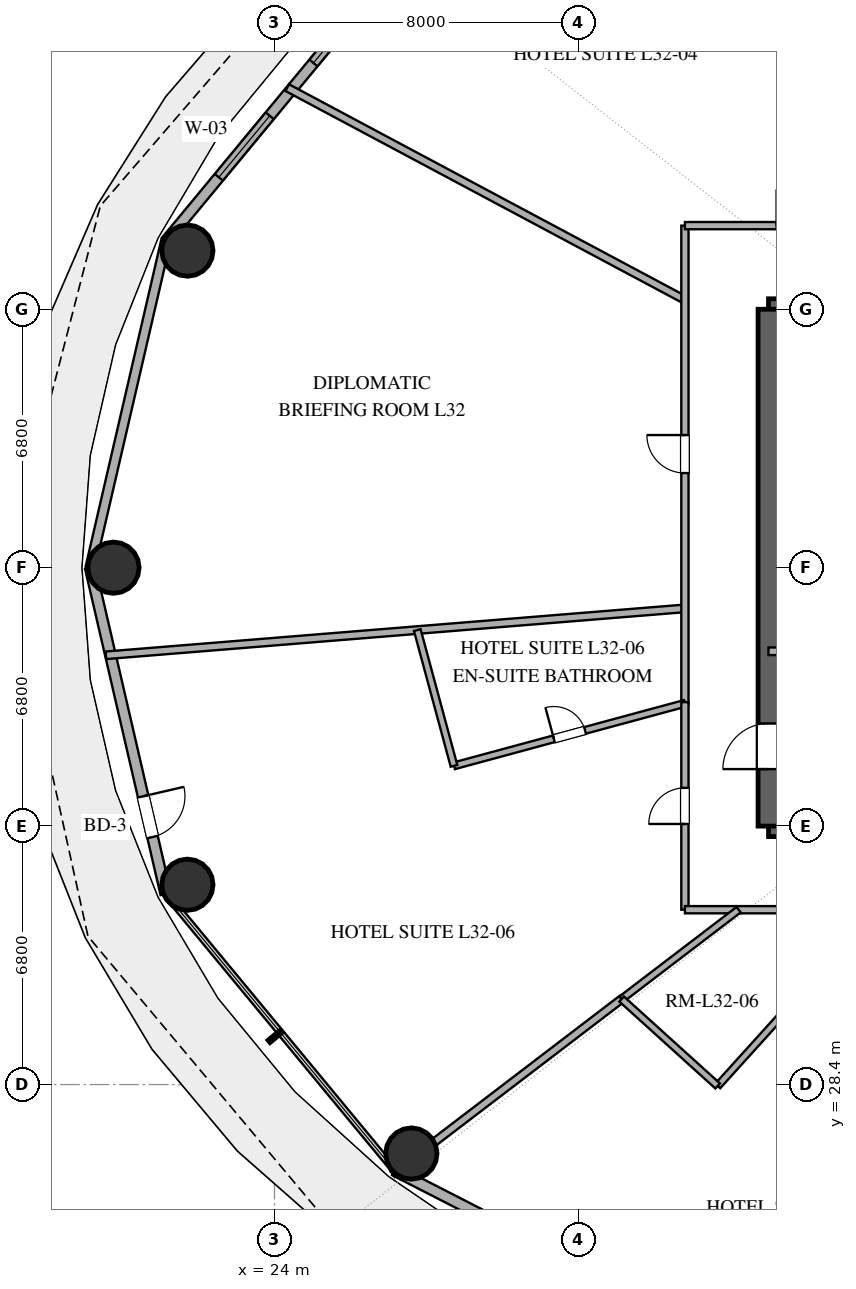
"""IFC4 building model, lengths in metres.
Left out: names, types, materials, properties, quantities, classifications, styles, units other than length and angle.
Written with IfcOpenShell. Run it as: python <this file> out.ifc"""

import sys

from ifc_helpers import new_model, si_unit, direction, frame, frame_2d, origin, origin_2d, place, context, subcontext, project, spatial, rectangle, hollow_circle, extrude, element, fill, save


model = new_model("IFC4")
c1 = context("Model", 3, precision=1e-05, world=origin(), true_north=direction((0.0, 1.0)))
c2 = subcontext(c1, "Body", "Model", "MODEL_VIEW")
j1 = project(units=[si_unit("LENGTHUNIT", "METRE"), si_unit("PLANEANGLEUNIT", "RADIAN")], contexts=[c1])
p1 = place(None, origin())
s1 = spatial("IfcSite", under=j1, at=p1, CompositionType="ELEMENT")
p2 = place(p1, origin())
s2 = spatial("IfcBuilding", under=s1, at=p2, CompositionType="ELEMENT")
p3 = place(p2, frame((0.0, 0.0, 127.2)))
s3 = spatial("IfcBuildingStorey", under=s2, at=p3, CompositionType="ELEMENT", Elevation=127.2)
for number, where, z_axis, x_axis in (
    (1, (37.0, 35.2, 0.0), (0.0, 0.0, 1.0), (1.0, 0.0, 0.0)),
    (2, (37.0, 48.8, 0.0), (0.0, 0.0, 1.0), (1.0, 0.0, 0.0)),
):
    element("IfcWall", number, at=place(p3, frame(where, z_axis=z_axis, x_axis=x_axis)), inside=s3, PredefinedType="SHEAR", context=c2, shape_type="SweptSolid", body=[
        extrude(rectangle(XDim=4.0, YDim=0.55, at=frame_2d((2.0, 0.0))), origin(), (0.0, 0.0, 1.0), 3.38),
    ])
p4 = place(p3, frame((37.0, 35.2, 0.0), z_axis=(0.0, 0.0, 1.0), x_axis=(0.0, 1.0, 0.0)))
e3 = element("IfcWall", 3, at=p4, inside=s3, PredefinedType="SHEAR", context=c2, shape_type="SweptSolid", body=[
    extrude(rectangle(XDim=13.6, YDim=0.55, at=frame_2d((6.8, 0.0))), origin(), (0.0, 0.0, 1.0), 3.38),
])
p5 = place(p4, frame((1.5, 0.0, 0.0)))
e4 = element("IfcOpeningElement", 4, at=p5, cuts=e3, PredefinedType="OPENING", context=c2, shape_type="SweptSolid", body=[
    extrude(rectangle(XDim=1.2, YDim=2.15, at=frame_2d((0.6, 1.075))), frame((0.0, 0.285, 0.0), z_axis=(0.0, -1.0, 0.0), x_axis=(1.0, 0.0, 0.0)), (0.0, 0.0, 1.0), 0.57),
])
for number, where, z_axis, x_axis in (
    (5, (21.709, 50.343, 0.0), (0.0, 0.0, 1.0), (1.0, 0.0, 0.0)),
    (6, (19.763, 42.0, 0.0), (0.0, 0.0, 1.0), (1.0, 0.0, 0.0)),
    (7, (21.709, 33.657, 0.0), (0.0, 0.0, 1.0), (1.0, 0.0, 0.0)),
    (8, (27.602, 26.585, 0.0), (0.0, 0.0, 1.0), (1.0, 0.0, 0.0)),
):
    element("IfcColumn", number, at=place(p3, frame(where, z_axis=z_axis, x_axis=x_axis)), inside=s3, PredefinedType="COLUMN", context=c2, shape_type="SweptSolid", body=[
        extrude(hollow_circle(Radius=0.675, WallThickness=0.036, at=origin_2d()), origin(), (0.0, 0.0, 1.0), 3.38),
    ])
p6 = place(p3, frame((27.16, 57.86, 0.0), z_axis=(0.0, 0.0, 1.0), x_axis=(-0.637505817448, -0.770445541696, 0.0)))
e9 = element("IfcWall", 9, at=p6, inside=s3, PredefinedType="SOLIDWALL", context=c2, shape_type="SweptSolid", body=[
    extrude(rectangle(XDim=9.445, YDim=0.28, at=frame_2d((4.723, 0.0))), origin(), (0.0, 0.0, 1.0), 3.38),
])
p7 = place(p6, frame((2.15, 0.0, 0.85)))
e10 = element("IfcOpeningElement", 10, at=p7, cuts=e9, PredefinedType="OPENING", context=c2, shape_type="SweptSolid", body=[
    extrude(rectangle(XDim=1.2, YDim=1.6, at=frame_2d((0.6, 0.8))), frame((0.0, 0.15, 0.0), z_axis=(0.0, -1.0, 0.0), x_axis=(1.0, 0.0, 0.0)), (0.0, 0.0, 1.0), 0.3),
])
p8 = place(p6, frame((5.153, 0.0, 0.85)))
e11 = element("IfcOpeningElement", 11, at=p8, cuts=e9, PredefinedType="OPENING", context=c2, shape_type="SweptSolid", body=[
    extrude(rectangle(XDim=2.1, YDim=2.2, at=frame_2d((1.05, 1.1))), frame((0.0, 0.15, 0.0), z_axis=(0.0, -1.0, 0.0), x_axis=(1.0, 0.0, 0.0)), (0.0, 0.0, 1.0), 0.3),
])
p9 = place(p3, frame((21.139, 50.583, 0.0), z_axis=(0.0, 0.0, 1.0), x_axis=(-0.22558597182, -0.974223264616, 0.0)))
e12 = element("IfcWall", 12, at=p9, inside=s3, PredefinedType="SOLIDWALL", context=c2, shape_type="SweptSolid", body=[
    extrude(rectangle(XDim=8.811, YDim=0.25, at=frame_2d((4.405, 0.0))), origin(), (0.0, 0.0, 1.0), 3.38),
])
p10 = place(p3, frame((19.151, 42.0, 0.0), z_axis=(0.0, 0.0, 1.0), x_axis=(0.22558597182, -0.974223264616, 0.0)))
e13 = element("IfcWall", 13, at=p10, inside=s3, PredefinedType="SOLIDWALL", context=c2, shape_type="SweptSolid", body=[
    extrude(rectangle(XDim=8.811, YDim=0.28, at=frame_2d((4.405, 0.0))), origin(), (0.0, 0.0, 1.0), 3.38),
])
p11 = place(p10, frame((6.175, 0.0, 0.0)))
e14 = element("IfcOpeningElement", 14, at=p11, cuts=e13, PredefinedType="OPENING", context=c2, shape_type="SweptSolid", body=[
    extrude(rectangle(XDim=1.1, YDim=2.25, at=frame_2d((0.55, 1.125))), frame((0.0, 0.15, 0.0), z_axis=(0.0, -1.0, 0.0), x_axis=(1.0, 0.0, 0.0)), (0.0, 0.0, 1.0), 0.3),
])
p12 = place(p3, frame((27.16, 26.14, 0.0), z_axis=(0.0, 0.0, 1.0), x_axis=(0.889959505023, -0.45603955905, 0.0)))
e15 = element("IfcWall", 15, at=p12, inside=s3, PredefinedType="SOLIDWALL", context=c2, shape_type="SweptSolid", body=[
    extrude(rectangle(XDim=10.662, YDim=0.28, at=frame_2d((5.331, 0.0))), origin(), (0.0, 0.0, 1.0), 3.38),
])
p13 = place(p12, frame((3.131, 0.0, 0.85)))
e16 = element("IfcOpeningElement", 16, at=p13, cuts=e15, PredefinedType="OPENING", context=c2, shape_type="SweptSolid", body=[
    extrude(rectangle(XDim=1.5, YDim=2.0, at=frame_2d((0.75, 1.0))), frame((0.0, 0.15, 0.0), z_axis=(0.0, -1.0, 0.0), x_axis=(1.0, 0.0, 0.0)), (0.0, 0.0, 1.0), 0.3),
])
p14 = place(p12, frame((6.171, 0.0, 0.85)))
e17 = element("IfcOpeningElement", 17, at=p14, cuts=e15, PredefinedType="OPENING", context=c2, shape_type="SweptSolid", body=[
    extrude(rectangle(XDim=1.5, YDim=2.0, at=frame_2d((0.75, 1.0))), frame((0.0, 0.15, 0.0), z_axis=(0.0, -1.0, 0.0), x_axis=(1.0, 0.0, 0.0)), (0.0, 0.0, 1.0), 0.3),
])
p15 = place(p3, frame((37.0, 39.8, 0.0), z_axis=(0.0, 0.0, 1.0), x_axis=(1.0, 0.0, 0.0)))
e18 = element("IfcWall", 18, at=p15, inside=s3, PredefinedType="SOLIDWALL", context=c2, shape_type="SweptSolid", body=[
    extrude(rectangle(XDim=4.0, YDim=0.2, at=frame_2d((2.0, 0.0))), origin(), (0.0, 0.0, 1.0), 2.74),
])
p16 = place(p15, frame((1.45, 0.0, 0.0)))
e19 = element("IfcOpeningElement", 19, at=p16, cuts=e18, PredefinedType="OPENING", context=c2, shape_type="SweptSolid", body=[
    extrude(rectangle(XDim=1.1, YDim=2.15, at=frame_2d((0.55, 1.075))), frame((0.0, 0.11, 0.0), z_axis=(0.0, -1.0, 0.0), x_axis=(1.0, 0.0, 0.0)), (0.0, 0.0, 1.0), 0.22),
])
p17 = place(p3, frame((24.335, 54.631, 0.0), z_axis=(0.0, 0.0, 1.0), x_axis=(0.882197358086, -0.470879837524, 0.0)))
e20 = element("IfcWall", 20, at=p17, inside=s3, PredefinedType="PARTITIONING", context=c2, shape_type="SweptSolid", body=[
    extrude(rectangle(XDim=11.862, YDim=0.2, at=frame_2d((5.931, 0.0))), origin(), (0.0, 0.0, 1.0), 2.74),
])
p18 = place(p3, frame((34.8, 40.929, 0.0), z_axis=(0.0, 0.0, 1.0), x_axis=(-0.996728109279, -0.080827446901, 0.0)))
e21 = element("IfcWall", 21, at=p18, inside=s3, PredefinedType="PARTITIONING", context=c2, shape_type="SweptSolid", body=[
    extrude(rectangle(XDim=15.287, YDim=0.2, at=frame_2d((7.644, 0.0))), origin(), (0.0, 0.0, 1.0), 2.74),
])
p19 = place(p3, frame((34.8, 38.396, 0.0), z_axis=(0.0, 0.0, 1.0), x_axis=(0.0, 1.0, 0.0)))
e22 = element("IfcWall", 22, at=p19, inside=s3, PredefinedType="PARTITIONING", context=c2, shape_type="SweptSolid", body=[
    extrude(rectangle(XDim=12.604, YDim=0.19, at=frame_2d((6.302, 0.0))), origin(), (0.0, 0.0, 1.0), 2.74),
])
p20 = place(p19, frame((6.094, 0.0, 0.0)))
e23 = element("IfcOpeningElement", 23, at=p20, cuts=e22, PredefinedType="OPENING", context=c2, shape_type="SweptSolid", body=[
    extrude(rectangle(XDim=1.0, YDim=2.2, at=frame_2d((0.5, 1.1))), frame((0.0, 0.105, 0.0), z_axis=(0.0, -1.0, 0.0), x_axis=(1.0, 0.0, 0.0)), (0.0, 0.0, 1.0), 0.21),
])
p21 = place(p3, frame((27.105, 26.046, 0.0), z_axis=(0.0, 0.0, 1.0), x_axis=(0.794798861724, 0.606872943376, 0.0)))
e24 = element("IfcWall", 24, at=p21, inside=s3, PredefinedType="PARTITIONING", context=c2, shape_type="SweptSolid", body=[
    extrude(rectangle(XDim=7.586, YDim=0.2, at=frame_2d((3.793, 0.0))), origin(), (0.0, 0.0, 1.0), 2.74),
])
p22 = place(p3, frame((42.974, 51.0, 0.0), z_axis=(0.0, 0.0, 1.0), x_axis=(-0.487587337482, 0.873074216964, 0.0)))
e25 = element("IfcWall", 25, at=p22, inside=s3, PredefinedType="PARTITIONING", context=c2, shape_type="SweptSolid", body=[
    extrude(rectangle(XDim=13.446, YDim=0.2, at=frame_2d((6.723, 0.0))), origin(), (0.0, 0.0, 1.0), 2.74),
])
p23 = place(p3, frame((28.724, 36.786, 0.0), z_axis=(0.0, 0.0, 1.0), x_axis=(0.965306865657, 0.261118086535, 0.0)))
e26 = element("IfcWall", 26, at=p23, inside=s3, PredefinedType="PLUMBINGWALL", context=c2, shape_type="SweptSolid", body=[
    extrude(rectangle(XDim=6.294, YDim=0.18, at=frame_2d((3.147, 0.0))), origin(), (0.0, 0.0, 1.0), 2.74),
])
p24 = place(p23, frame((2.722, 0.0, 0.0)))
e27 = element("IfcOpeningElement", 27, at=p24, cuts=e26, PredefinedType="OPENING", context=c2, shape_type="SweptSolid", body=[
    extrude(rectangle(XDim=0.85, YDim=2.1, at=frame_2d((0.425, 1.05))), frame((0.0, 0.1, 0.0), z_axis=(0.0, -1.0, 0.0), x_axis=(1.0, 0.0, 0.0)), (0.0, 0.0, 1.0), 0.2),
])
p25 = place(p3, frame((39.857, 33.0, 0.0), z_axis=(0.0, 0.0, 1.0), x_axis=(-0.670890833363, -0.741556127147, 0.0)))
e28 = element("IfcWall", 28, at=p25, inside=s3, PredefinedType="PLUMBINGWALL", context=c2, shape_type="SweptSolid", body=[
    extrude(rectangle(XDim=6.253, YDim=0.18, at=frame_2d((3.127, 0.0))), origin(), (0.0, 0.0, 1.0), 2.74),
])
p26 = place(p25, frame((2.702, 0.0, 0.0)))
e29 = element("IfcOpeningElement", 29, at=p26, cuts=e28, PredefinedType="OPENING", context=c2, shape_type="SweptSolid", body=[
    extrude(rectangle(XDim=0.85, YDim=2.1, at=frame_2d((0.425, 1.05))), frame((0.0, 0.1, 0.0), z_axis=(0.0, -1.0, 0.0), x_axis=(1.0, 0.0, 0.0)), (0.0, 0.0, 1.0), 0.2),
])
p27 = place(p3, frame((34.8, 51.0, 0.0), z_axis=(0.0, 0.0, 1.0), x_axis=(1.0, 0.0, 0.0)))
e30 = element("IfcWall", 30, at=p27, inside=s3, PredefinedType="PARTITIONING", context=c2, shape_type="SweptSolid", body=[
    extrude(rectangle(XDim=8.21, YDim=0.19, at=frame_2d((4.105, 0.0))), origin(), (0.0, 0.0, 1.0), 2.74),
])
p28 = place(p27, frame((2.412, 0.0, 0.0)))
e31 = element("IfcOpeningElement", 31, at=p28, cuts=e30, PredefinedType="OPENING", context=c2, shape_type="SweptSolid", body=[
    extrude(rectangle(XDim=0.95, YDim=2.15, at=frame_2d((0.475, 1.075))), frame((0.0, 0.105, 0.0), z_axis=(0.0, -1.0, 0.0), x_axis=(1.0, 0.0, 0.0)), (0.0, 0.0, 1.0), 0.21),
])
p29 = place(p3, frame((34.8, 33.0, 0.0), z_axis=(0.0, 0.0, 1.0), x_axis=(0.0, 1.0, 0.0)))
e32 = element("IfcWall", 32, at=p29, inside=s3, PredefinedType="PARTITIONING", context=c2, shape_type="SweptSolid", body=[
    extrude(rectangle(XDim=5.463, YDim=0.19, at=frame_2d((2.731, 0.0))), origin(), (0.0, 0.0, 1.0), 2.74),
])
p30 = place(p29, frame((2.256, 0.0, 0.0)))
e33 = element("IfcOpeningElement", 33, at=p30, cuts=e32, PredefinedType="OPENING", context=c2, shape_type="SweptSolid", body=[
    extrude(rectangle(XDim=0.95, YDim=2.15, at=frame_2d((0.475, 1.075))), frame((0.0, 0.105, 0.0), z_axis=(0.0, -1.0, 0.0), x_axis=(1.0, 0.0, 0.0)), (0.0, 0.0, 1.0), 0.21),
])
p31 = place(p3, frame((51.914, 33.0, 0.0), z_axis=(0.0, 0.0, 1.0), x_axis=(-1.0, 0.0, 0.0)))
e34 = element("IfcWall", 34, at=p31, inside=s3, PredefinedType="PARTITIONING", context=c2, shape_type="SweptSolid", body=[
    extrude(rectangle(XDim=17.114, YDim=0.19, at=frame_2d((8.557, 0.0))), origin(), (0.0, 0.0, 1.0), 2.74),
])
p32 = place(p31, frame((4.021, 0.0, 0.0)))
e35 = element("IfcOpeningElement", 35, at=p32, cuts=e34, PredefinedType="OPENING", context=c2, shape_type="SweptSolid", body=[
    extrude(rectangle(XDim=1.0, YDim=2.2, at=frame_2d((0.5, 1.1))), frame((0.0, 0.105, 0.0), z_axis=(0.0, -1.0, 0.0), x_axis=(1.0, 0.0, 0.0)), (0.0, 0.0, 1.0), 0.21),
])
p33 = place(p31, frame((9.145, 0.0, 0.0)))
e36 = element("IfcOpeningElement", 36, at=p33, cuts=e34, PredefinedType="OPENING", context=c2, shape_type="SweptSolid", body=[
    extrude(rectangle(XDim=0.95, YDim=2.15, at=frame_2d((0.475, 1.075))), frame((0.0, 0.105, 0.0), z_axis=(0.0, -1.0, 0.0), x_axis=(1.0, 0.0, 0.0)), (0.0, 0.0, 1.0), 0.21),
])
p34 = place(p3, frame((33.135, 30.649, 0.0), z_axis=(0.0, 0.0, 1.0), x_axis=(0.794788820215, 0.606886094141, 0.0)))
e37 = element("IfcWall", 37, at=p34, inside=s3, PredefinedType="PLUMBINGWALL", context=c2, shape_type="SweptSolid", body=[
    extrude(rectangle(XDim=3.873, YDim=0.18, at=frame_2d((1.937, 0.0))), origin(), (0.0, 0.0, 1.0), 2.74),
])
p35 = place(p3, frame((27.758, 40.358, 0.0), z_axis=(0.0, 0.0, 1.0), x_axis=(0.261163229173, -0.96529465332, 0.0)))
e38 = element("IfcWall", 38, at=p35, inside=s3, PredefinedType="PLUMBINGWALL", context=c2, shape_type="SweptSolid", body=[
    extrude(rectangle(XDim=3.701, YDim=0.18, at=frame_2d((1.851, 0.0))), origin(), (0.0, 0.0, 1.0), 2.74),
])
p36 = place(p3, frame((35.662, 28.363, 0.0), z_axis=(0.0, 0.0, 1.0), x_axis=(-0.741571413778, 0.670873936196, 0.0)))
e39 = element("IfcWall", 39, at=p36, inside=s3, PredefinedType="PLUMBINGWALL", context=c2, shape_type="SweptSolid", body=[
    extrude(rectangle(XDim=3.408, YDim=0.18, at=frame_2d((1.704, 0.0))), origin(), (0.0, 0.0, 1.0), 2.74),
])
p37 = place(p7, origin())
e40 = element("IfcWindow", 40, at=p37, inside=s3, PartitioningType="SINGLE_PANEL", PredefinedType="WINDOW", context=c2, shape_type="SweptSolid", body=[
    extrude(rectangle(XDim=1.2, YDim=1.6, at=frame_2d((0.6, 0.8))), frame((0.0, 0.03, 0.0), z_axis=(0.0, -1.0, 0.0), x_axis=(1.0, 0.0, 0.0)), (0.0, 0.0, 1.0), 0.06),
])
fill(e10, e40)
p38 = place(p8, origin())
e41 = element("IfcWindow", 41, at=p38, inside=s3, PartitioningType="SINGLE_PANEL", PredefinedType="WINDOW", context=c2, shape_type="SweptSolid", body=[
    extrude(rectangle(XDim=2.1, YDim=2.2, at=frame_2d((1.05, 1.1))), frame((0.0, 0.03, 0.0), z_axis=(0.0, -1.0, 0.0), x_axis=(1.0, 0.0, 0.0)), (0.0, 0.0, 1.0), 0.06),
])
fill(e11, e41)
p39 = place(p11, origin())
e42 = element("IfcDoor", 42, at=p39, inside=s3, OperationType="SINGLE_SWING_LEFT", PredefinedType="DOOR", context=c2, shape_type="SweptSolid", body=[
    extrude(rectangle(XDim=1.1, YDim=2.25, at=frame_2d((0.55, 1.125))), frame((0.0, 0.025, 0.0), z_axis=(0.0, -1.0, 0.0), x_axis=(1.0, 0.0, 0.0)), (0.0, 0.0, 1.0), 0.05),
])
fill(e14, e42)
p40 = place(p5, origin())
e43 = element("IfcDoor", 43, at=p40, inside=s3, OperationType="SINGLE_SWING_LEFT", PredefinedType="DOOR", context=c2, shape_type="SweptSolid", body=[
    extrude(rectangle(XDim=1.2, YDim=2.15, at=frame_2d((0.6, 1.075))), frame((0.0, 0.025, 0.0), z_axis=(0.0, -1.0, 0.0), x_axis=(1.0, 0.0, 0.0)), (0.0, 0.0, 1.0), 0.05),
])
fill(e4, e43)
p41 = place(p20, origin())
e44 = element("IfcDoor", 44, at=p41, inside=s3, OperationType="SINGLE_SWING_RIGHT", PredefinedType="DOOR", context=c2, shape_type="SweptSolid", body=[
    extrude(rectangle(XDim=1.0, YDim=2.2, at=frame_2d((0.5, 1.1))), frame((0.0, 0.025, 0.0), z_axis=(0.0, -1.0, 0.0), x_axis=(1.0, 0.0, 0.0)), (0.0, 0.0, 1.0), 0.05),
])
fill(e23, e44)
p42 = place(p24, origin())
e45 = element("IfcDoor", 45, at=p42, inside=s3, OperationType="SINGLE_SWING_LEFT", PredefinedType="DOOR", context=c2, shape_type="SweptSolid", body=[
    extrude(rectangle(XDim=0.85, YDim=2.1, at=frame_2d((0.425, 1.05))), frame((0.0, 0.025, 0.0), z_axis=(0.0, -1.0, 0.0), x_axis=(1.0, 0.0, 0.0)), (0.0, 0.0, 1.0), 0.05),
])
fill(e27, e45)
p43 = place(p28, origin())
e46 = element("IfcDoor", 46, at=p43, inside=s3, OperationType="SINGLE_SWING_LEFT", PredefinedType="DOOR", context=c2, shape_type="SweptSolid", body=[
    extrude(rectangle(XDim=0.95, YDim=2.15, at=frame_2d((0.475, 1.075))), frame((0.0, 0.025, 0.0), z_axis=(0.0, -1.0, 0.0), x_axis=(1.0, 0.0, 0.0)), (0.0, 0.0, 1.0), 0.05),
])
fill(e31, e46)
p44 = place(p30, origin())
e47 = element("IfcDoor", 47, at=p44, inside=s3, OperationType="SINGLE_SWING_LEFT", PredefinedType="DOOR", context=c2, shape_type="SweptSolid", body=[
    extrude(rectangle(XDim=0.95, YDim=2.15, at=frame_2d((0.475, 1.075))), frame((0.0, 0.025, 0.0), z_axis=(0.0, -1.0, 0.0), x_axis=(1.0, 0.0, 0.0)), (0.0, 0.0, 1.0), 0.05),
])
fill(e33, e47)
save(model, sys.argv[1])
